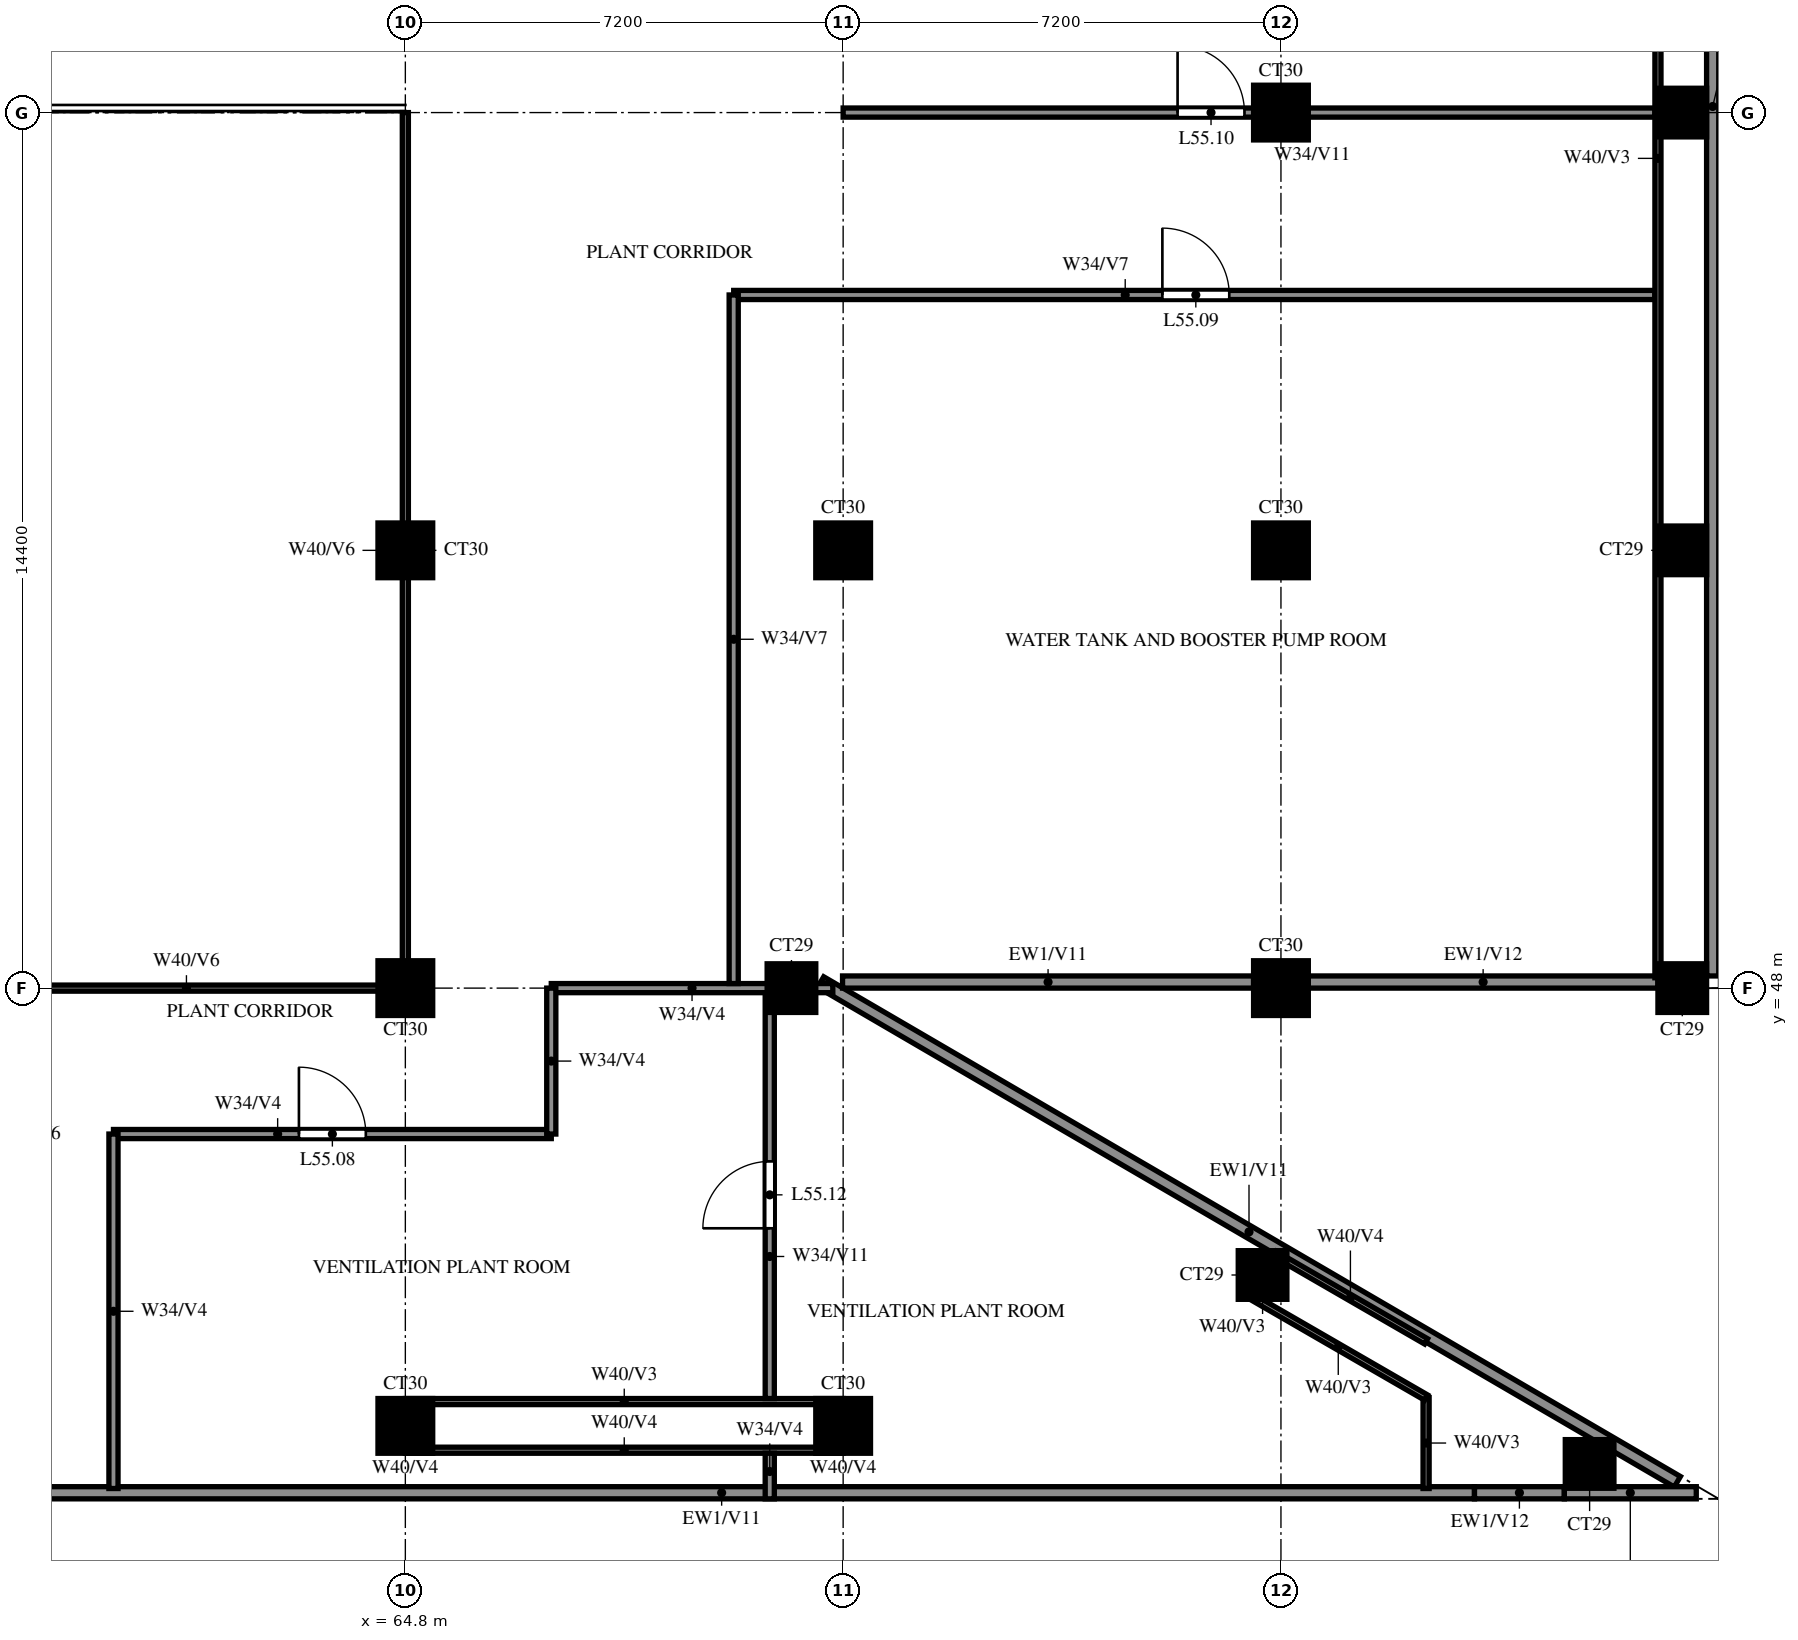
"""IFC4 building model, lengths in metres.
Left out: names, types, materials, properties, quantities, classifications, styles, units other than length and angle.
Written with IfcOpenShell. Run it as: python <this file> out.ifc"""

import sys

from ifc_helpers import new_model, si_unit, direction, frame, frame_2d, origin, origin_2d, place, context, subcontext, project, spatial, rectangle, extrude, source, transform, mapped, element, fill, save


model = new_model("IFC4")
c1 = context("Model", 3, precision=1e-05, world=origin(), true_north=direction((0.0, 1.0)))
c2 = subcontext(c1, "Body", "Model", "MODEL_VIEW")
j1 = project(units=[si_unit("LENGTHUNIT", "METRE"), si_unit("PLANEANGLEUNIT", "RADIAN")], contexts=[c1])
p1 = place(None, origin())
s1 = spatial("IfcSite", under=j1, at=p1, CompositionType="ELEMENT")
p2 = place(p1, origin())
s2 = spatial("IfcBuilding", under=s1, at=p2, CompositionType="ELEMENT")
p3 = place(p2, frame((0.0, 0.0, 206.0)))
s3 = spatial("IfcBuildingStorey", under=s2, at=p3, CompositionType="ELEMENT", Elevation=206.0)
m1 = source(origin(), c2, "Body", "SweptSolid", [
    extrude(rectangle(XDim=0.8, YDim=0.8, at=origin_2d()), origin(), (0.0, 0.0, 1.0), 5.22),
])
p4 = place(p3, frame((84.276, 40.174, 0.0), z_axis=(0.0, 0.0, 1.0), x_axis=(1.0, 0.0, 0.0)))
e1 = element("IfcColumn", 1, at=p4, inside=s3, PredefinedType="COLUMN", context=c2, shape_type="MappedRepresentation", body=[
    mapped(m1, transform((0.0, 0.0, 0.0))),
])
m2 = source(origin(), c2, "Body", "SweptSolid", [
    extrude(rectangle(XDim=0.9, YDim=0.9, at=origin_2d()), origin(), (0.0, 0.0, 1.0), 5.22),
])
for number, where, z_axis, x_axis in (
    (2, (64.8, 40.8, 0.0), (0.0, 0.0, 1.0), (1.0, 0.0, 0.0)),
    (3, (72.0, 40.8, 0.0), (0.0, 0.0, 1.0), (1.0, 0.0, 0.0)),
):
    element("IfcColumn", number, at=place(p3, frame(where, z_axis=z_axis, x_axis=x_axis)), inside=s3, PredefinedType="COLUMN", context=c2, shape_type="MappedRepresentation", body=[
        mapped(m2, transform((0.0, 0.0, 0.0))),
    ])
p5 = place(p3, frame((78.898, 43.282, 0.0), z_axis=(0.0, 0.0, 1.0), x_axis=(1.0, 0.0, 0.0)))
e4 = element("IfcColumn", 4, at=p5, inside=s3, PredefinedType="COLUMN", context=c2, shape_type="MappedRepresentation", body=[
    mapped(m1, transform((0.0, 0.0, 0.0))),
])
p6 = place(p3, frame((64.8, 48.0, 0.0), z_axis=(0.0, 0.0, 1.0), x_axis=(1.0, 0.0, 0.0)))
e5 = element("IfcColumn", 5, at=p6, inside=s3, PredefinedType="COLUMN", context=c2, shape_type="MappedRepresentation", body=[
    mapped(m2, transform((0.0, 0.0, 0.0))),
])
p7 = place(p3, frame((71.15, 48.0, 0.0), z_axis=(0.0, 0.0, 1.0), x_axis=(1.0, 0.0, 0.0)))
e6 = element("IfcColumn", 6, at=p7, inside=s3, PredefinedType="COLUMN", context=c2, shape_type="MappedRepresentation", body=[
    mapped(m1, transform((0.0, 0.0, 0.0))),
])
p8 = place(p3, frame((79.2, 48.0, 0.0), z_axis=(0.0, 0.0, 1.0), x_axis=(1.0, 0.0, 0.0)))
e7 = element("IfcColumn", 7, at=p8, inside=s3, PredefinedType="COLUMN", context=c2, shape_type="MappedRepresentation", body=[
    mapped(m2, transform((0.0, 0.0, 0.0))),
])
p9 = place(p3, frame((85.8, 48.0, 0.0), z_axis=(0.0, 0.0, 1.0), x_axis=(1.0, 0.0, 0.0)))
e8 = element("IfcColumn", 8, at=p9, inside=s3, PredefinedType="COLUMN", context=c2, shape_type="MappedRepresentation", body=[
    mapped(m1, transform((0.0, 0.0, 0.0))),
])
for number, where, z_axis, x_axis in (
    (9, (64.8, 55.2, 0.0), (0.0, 0.0, 1.0), (1.0, 0.0, 0.0)),
    (10, (72.0, 55.2, 0.0), (0.0, 0.0, 1.0), (1.0, 0.0, 0.0)),
    (11, (79.2, 55.2, 0.0), (0.0, 0.0, 1.0), (1.0, 0.0, 0.0)),
):
    element("IfcColumn", number, at=place(p3, frame(where, z_axis=z_axis, x_axis=x_axis)), inside=s3, PredefinedType="COLUMN", context=c2, shape_type="MappedRepresentation", body=[
        mapped(m2, transform((0.0, 0.0, 0.0))),
    ])
p10 = place(p3, frame((85.8, 55.2, 0.0), z_axis=(0.0, 0.0, 1.0), x_axis=(1.0, 0.0, 0.0)))
e12 = element("IfcColumn", 12, at=p10, inside=s3, PredefinedType="COLUMN", context=c2, shape_type="MappedRepresentation", body=[
    mapped(m1, transform((0.0, 0.0, 0.0))),
])
p11 = place(p3, frame((79.2, 62.4, 0.0), z_axis=(0.0, 0.0, 1.0), x_axis=(1.0, 0.0, 0.0)))
e13 = element("IfcColumn", 13, at=p11, inside=s3, PredefinedType="COLUMN", context=c2, shape_type="MappedRepresentation", body=[
    mapped(m2, transform((0.0, 0.0, 0.0))),
])
p12 = place(p3, frame((85.8, 62.4, 0.0), z_axis=(0.0, 0.0, 1.0), x_axis=(1.0, 0.0, 0.0)))
e14 = element("IfcColumn", 14, at=p12, inside=s3, PredefinedType="COLUMN", context=c2, shape_type="MappedRepresentation", body=[
    mapped(m1, transform((0.0, 0.0, 0.0))),
])
p13 = place(p3, frame((85.719, 39.881, 0.0), z_axis=(0.0, 0.0, 1.0), x_axis=(-0.86377618652, 0.503875678716, 0.0)))
e15 = element("IfcWall", 15, at=p13, inside=s3, PredefinedType="SOLIDWALL", context=c2, shape_type="SweptSolid", body=[
    extrude(rectangle(XDim=16.311, YDim=0.2, at=frame_2d((8.156, 0.0))), origin(), (0.0, 0.0, 1.0), 5.22),
])
p14 = place(p3, frame((71.99, 48.1, 0.0), z_axis=(0.0, 0.0, 1.0), x_axis=(1.0, 0.0, 0.0)))
e16 = element("IfcWall", 16, at=p14, inside=s3, PredefinedType="SOLIDWALL", context=c2, shape_type="SweptSolid", body=[
    extrude(rectangle(XDim=6.76, YDim=0.2, at=frame_2d((3.38, 0.0))), origin(), (0.0, 0.0, 1.0), 5.22),
])
p15 = place(p3, frame((79.65, 48.1, 0.0), z_axis=(0.0, 0.0, 1.0), x_axis=(1.0, 0.0, 0.0)))
e17 = element("IfcWall", 17, at=p15, inside=s3, PredefinedType="SOLIDWALL", context=c2, shape_type="SweptSolid", body=[
    extrude(rectangle(XDim=5.75, YDim=0.2, at=frame_2d((2.875, 0.0))), origin(), (0.0, 0.0, 1.0), 3.72),
])
p16 = place(p3, frame((86.3, 48.2, 0.0), z_axis=(0.0, 0.0, 1.0), x_axis=(0.0, 1.0, 0.0)))
e18 = element("IfcWall", 18, at=p16, inside=s3, PredefinedType="SOLIDWALL", context=c2, shape_type="SweptSolid", body=[
    extrude(rectangle(XDim=28.6, YDim=0.2, at=frame_2d((14.3, 0.0))), origin(), (0.0, 0.0, 1.0), 5.22),
])
p17 = place(p3, frame((58.8, 39.7, 0.0), z_axis=(0.0, 0.0, 1.0), x_axis=(1.0, 0.0, 0.0)))
e19 = element("IfcWall", 19, at=p17, inside=s3, PredefinedType="SOLIDWALL", context=c2, shape_type="SweptSolid", body=[
    extrude(rectangle(XDim=23.583, YDim=0.2, at=frame_2d((11.792, 0.0))), origin(), (0.0, 0.0, 1.0), 5.22),
])
p18 = place(p3, frame((64.8, 40.4, 0.0), z_axis=(0.0, 0.0, 1.0), x_axis=(1.0, 0.0, 0.0)))
e20 = element("IfcWall", 20, at=p18, inside=s3, PredefinedType="PARTITIONING", context=c2, shape_type="SweptSolid", body=[
    extrude(rectangle(XDim=7.2, YDim=0.1, at=frame_2d((3.6, 0.0))), origin(), (0.0, 0.0, 1.0), 5.22),
])
p19 = place(p3, frame((64.8, 41.2, 0.0), z_axis=(0.0, 0.0, 1.0), x_axis=(1.0, 0.0, 0.0)))
e21 = element("IfcWall", 21, at=p19, inside=s3, PredefinedType="PARTITIONING", context=c2, shape_type="SweptSolid", body=[
    extrude(rectangle(XDim=7.2, YDim=0.1, at=frame_2d((3.6, 0.0))), origin(), (0.0, 0.0, 1.0), 3.72),
])
p20 = place(p3, frame((60.0, 45.6, 0.0), z_axis=(0.0, 0.0, 1.0), x_axis=(1.0, 0.0, 0.0)))
e22 = element("IfcWall", 22, at=p20, inside=s3, PredefinedType="PARTITIONING", context=c2, shape_type="SweptSolid", body=[
    extrude(rectangle(XDim=7.2, YDim=0.15, at=frame_2d((3.6, 0.0))), origin(), (0.0, 0.0, 1.0), 5.22),
])
p21 = place(p20, frame((3.05, 0.0, 0.0)))
e23 = element("IfcOpeningElement", 23, at=p21, cuts=e22, PredefinedType="OPENING", context=c2, shape_type="SweptSolid", body=[
    extrude(rectangle(XDim=1.1, YDim=2.1, at=frame_2d((0.55, 1.05))), frame((0.0, 0.085, 0.0), z_axis=(0.0, -1.0, 0.0), x_axis=(1.0, 0.0, 0.0)), (0.0, 0.0, 1.0), 0.17),
])
p22 = place(p3, frame((57.6, 48.0, 0.0), z_axis=(0.0, 0.0, 1.0), x_axis=(1.0, 0.0, 0.0)))
e24 = element("IfcWall", 24, at=p22, inside=s3, PredefinedType="PARTITIONING", context=c2, shape_type="SweptSolid", body=[
    extrude(rectangle(XDim=7.2, YDim=0.1, at=frame_2d((3.6, 0.0))), origin(), (0.0, 0.0, 1.0), 4.32),
])
p23 = place(p3, frame((67.2, 48.0, 0.0), z_axis=(0.0, 0.0, 1.0), x_axis=(1.0, 0.0, 0.0)))
e25 = element("IfcWall", 25, at=p23, inside=s3, PredefinedType="PARTITIONING", context=c2, shape_type="SweptSolid", body=[
    extrude(rectangle(XDim=4.63, YDim=0.15, at=frame_2d((2.315, 0.0))), origin(), (0.0, 0.0, 1.0), 5.22),
])
p24 = place(p3, frame((70.2, 59.4, 0.0), z_axis=(0.0, 0.0, 1.0), x_axis=(1.0, 0.0, 0.0)))
e26 = element("IfcWall", 26, at=p24, inside=s3, PredefinedType="PARTITIONING", context=c2, shape_type="SweptSolid", body=[
    extrude(rectangle(XDim=15.15, YDim=0.15, at=frame_2d((7.575, 0.0))), origin(), (0.0, 0.0, 1.0), 4.32),
])
p25 = place(p24, frame((7.05, 0.0, 0.0)))
e27 = element("IfcOpeningElement", 27, at=p25, cuts=e26, PredefinedType="OPENING", context=c2, shape_type="SweptSolid", body=[
    extrude(rectangle(XDim=1.1, YDim=2.1, at=frame_2d((0.55, 1.05))), frame((0.0, 0.085, 0.0), z_axis=(0.0, -1.0, 0.0), x_axis=(1.0, 0.0, 0.0)), (0.0, 0.0, 1.0), 0.17),
])
p26 = place(p3, frame((72.0, 62.4, 0.0), z_axis=(0.0, 0.0, 1.0), x_axis=(1.0, 0.0, 0.0)))
e28 = element("IfcWall", 28, at=p26, inside=s3, PredefinedType="PARTITIONING", context=c2, shape_type="SweptSolid", body=[
    extrude(rectangle(XDim=13.35, YDim=0.15, at=frame_2d((6.675, 0.0))), origin(), (0.0, 0.0, 1.0), 3.72),
])
p27 = place(p26, frame((5.5, 0.0, 0.0)))
e29 = element("IfcOpeningElement", 29, at=p27, cuts=e28, PredefinedType="OPENING", context=c2, shape_type="SweptSolid", body=[
    extrude(rectangle(XDim=1.1, YDim=2.1, at=frame_2d((0.55, 1.05))), frame((0.0, 0.085, 0.0), z_axis=(0.0, -1.0, 0.0), x_axis=(1.0, 0.0, 0.0)), (0.0, 0.0, 1.0), 0.17),
])
p28 = place(p3, frame((60.0, 39.77, 0.0), z_axis=(0.0, 0.0, 1.0), x_axis=(0.0, 1.0, 0.0)))
e30 = element("IfcWall", 30, at=p28, inside=s3, PredefinedType="PARTITIONING", context=c2, shape_type="SweptSolid", body=[
    extrude(rectangle(XDim=5.83, YDim=0.15, at=frame_2d((2.915, 0.0))), origin(), (0.0, 0.0, 1.0), 5.22),
])
p29 = place(p3, frame((64.8, 40.4, 0.0), z_axis=(0.0, 0.0, 1.0), x_axis=(0.0, 1.0, 0.0)))
e31 = element("IfcWall", 31, at=p29, inside=s3, PredefinedType="PARTITIONING", context=c2, shape_type="SweptSolid", body=[
    extrude(rectangle(XDim=0.8, YDim=0.1, at=frame_2d((0.4, 0.0))), origin(), (0.0, 0.0, 1.0), 5.22),
])
p30 = place(p3, frame((64.8, 48.0, 0.0), z_axis=(0.0, 0.0, 1.0), x_axis=(0.0, 1.0, 0.0)))
e32 = element("IfcWall", 32, at=p30, inside=s3, PredefinedType="PARTITIONING", context=c2, shape_type="SweptSolid", body=[
    extrude(rectangle(XDim=14.4, YDim=0.1, at=frame_2d((7.2, 0.0))), origin(), (0.0, 0.0, 1.0), 4.32),
])
p31 = place(p3, frame((67.2, 45.6, 0.0), z_axis=(0.0, 0.0, 1.0), x_axis=(0.0, 1.0, 0.0)))
e33 = element("IfcWall", 33, at=p31, inside=s3, PredefinedType="PARTITIONING", context=c2, shape_type="SweptSolid", body=[
    extrude(rectangle(XDim=2.4, YDim=0.15, at=frame_2d((1.2, 0.0))), origin(), (0.0, 0.0, 1.0), 5.22),
])
p32 = place(p3, frame((70.2, 48.075, 0.0), z_axis=(0.0, 0.0, 1.0), x_axis=(0.0, 1.0, 0.0)))
e34 = element("IfcWall", 34, at=p32, inside=s3, PredefinedType="PARTITIONING", context=c2, shape_type="SweptSolid", body=[
    extrude(rectangle(XDim=11.325, YDim=0.15, at=frame_2d((5.663, 0.0))), origin(), (0.0, 0.0, 1.0), 4.32),
])
p33 = place(p3, frame((70.793, 39.6, 0.0), z_axis=(0.0, 0.0, 1.0), x_axis=(0.0, 1.0, 0.0)))
e35 = element("IfcWall", 35, at=p33, inside=s3, PredefinedType="PARTITIONING", context=c2, shape_type="SweptSolid", body=[
    extrude(rectangle(XDim=0.75, YDim=0.15, at=frame_2d((0.375, 0.0))), origin(), (0.0, 0.0, 1.0), 5.22),
])
p34 = place(p3, frame((70.793, 41.25, 0.0), z_axis=(0.0, 0.0, 1.0), x_axis=(0.0, 1.0, 0.0)))
e36 = element("IfcWall", 36, at=p34, inside=s3, PredefinedType="PARTITIONING", context=c2, shape_type="SweptSolid", body=[
    extrude(rectangle(XDim=6.675, YDim=0.15, at=frame_2d((3.337, 0.0))), origin(), (0.0, 0.0, 1.0), 3.72),
])
p35 = place(p34, frame((2.8, 0.0, 0.0)))
e37 = element("IfcOpeningElement", 37, at=p35, cuts=e36, PredefinedType="OPENING", context=c2, shape_type="SweptSolid", body=[
    extrude(rectangle(XDim=1.1, YDim=2.1, at=frame_2d((0.55, 1.05))), frame((0.0, 0.085, 0.0), z_axis=(0.0, -1.0, 0.0), x_axis=(1.0, 0.0, 0.0)), (0.0, 0.0, 1.0), 0.17),
])
p36 = place(p3, frame((72.0, 40.4, 0.0), z_axis=(0.0, 0.0, 1.0), x_axis=(0.0, 1.0, 0.0)))
e38 = element("IfcWall", 38, at=p36, inside=s3, PredefinedType="PARTITIONING", context=c2, shape_type="SweptSolid", body=[
    extrude(rectangle(XDim=0.8, YDim=0.1, at=frame_2d((0.4, 0.0))), origin(), (0.0, 0.0, 1.0), 5.22),
])
p37 = place(p3, frame((81.587, 39.77, 0.0), z_axis=(0.0, 0.0, 1.0), x_axis=(0.0, 1.0, 0.0)))
e39 = element("IfcWall", 39, at=p37, inside=s3, PredefinedType="PARTITIONING", context=c2, shape_type="SweptSolid", body=[
    extrude(rectangle(XDim=1.496, YDim=0.1, at=frame_2d((0.748, 0.0))), origin(), (0.0, 0.0, 1.0), 3.72),
])
p38 = place(p3, frame((85.4, 48.17, 0.0), z_axis=(0.0, 0.0, 1.0), x_axis=(0.0, 1.0, 0.0)))
e40 = element("IfcWall", 40, at=p38, inside=s3, PredefinedType="PARTITIONING", context=c2, shape_type="SweptSolid", body=[
    extrude(rectangle(XDim=28.372, YDim=0.1, at=frame_2d((14.186, 0.0))), origin(), (0.0, 0.0, 1.0), 3.72),
])
p39 = place(p3, frame((81.587, 41.266, 0.0), z_axis=(0.0, 0.0, 1.0), x_axis=(-0.865891839094, 0.500231269505, 0.0)))
e41 = element("IfcWall", 41, at=p39, inside=s3, PredefinedType="PARTITIONING", context=c2, shape_type="SweptSolid", body=[
    extrude(rectangle(XDim=3.336, YDim=0.1, at=frame_2d((1.668, 0.0))), origin(), (0.0, 0.0, 1.0), 3.72),
])
p40 = place(p3, frame((78.698, 42.935, 0.0), z_axis=(0.0, 0.0, 1.0), x_axis=(0.499880961361, 0.866094119867, 0.0)))
e42 = element("IfcWall", 42, at=p40, inside=s3, PredefinedType="PARTITIONING", context=c2, shape_type="SweptSolid", body=[
    extrude(rectangle(XDim=0.8, YDim=0.1, at=frame_2d((0.4, 0.0))), origin(), (0.0, 0.0, 1.0), 3.72),
])
p41 = place(p3, frame((79.098, 43.628, 0.0), z_axis=(0.0, 0.0, 1.0), x_axis=(0.865881423994, -0.500249297433, 0.0)))
e43 = element("IfcWall", 43, at=p41, inside=s3, PredefinedType="PARTITIONING", context=c2, shape_type="SweptSolid", body=[
    extrude(rectangle(XDim=2.875, YDim=0.1, at=frame_2d((1.437, 0.0))), origin(), (0.0, 0.0, 1.0), 5.22),
])
p42 = place(p3, frame((82.383, 39.7, 0.0), z_axis=(0.0, 0.0, 1.0), x_axis=(1.0, 0.0, 0.0)))
e44 = element("IfcWall", 44, at=p42, inside=s3, PredefinedType="SOLIDWALL", context=c2, shape_type="SweptSolid", body=[
    extrude(rectangle(XDim=1.478, YDim=0.2, at=frame_2d((0.739, 0.0))), origin(), (0.0, 0.0, 1.0), 3.72),
])
p43 = place(p3, frame((83.861, 39.7, 0.0), z_axis=(0.0, 0.0, 1.0), x_axis=(1.0, 0.0, 0.0)))
e45 = element("IfcWall", 45, at=p43, inside=s3, PredefinedType="SOLIDWALL", context=c2, shape_type="SweptSolid", body=[
    extrude(rectangle(XDim=2.169, YDim=0.2, at=frame_2d((1.085, 0.0))), origin(), (0.0, 0.0, 1.0), 5.22),
])
p44 = place(p21, origin())
e46 = element("IfcDoor", 46, at=p44, inside=s3, OperationType="SINGLE_SWING_RIGHT", PredefinedType="DOOR", context=c2, shape_type="SweptSolid", body=[
    extrude(rectangle(XDim=1.1, YDim=2.1, at=frame_2d((0.55, 1.05))), frame((0.0, 0.025, 0.0), z_axis=(0.0, -1.0, 0.0), x_axis=(1.0, 0.0, 0.0)), (0.0, 0.0, 1.0), 0.05),
])
fill(e23, e46)
p45 = place(p25, origin())
e47 = element("IfcDoor", 47, at=p45, inside=s3, OperationType="SINGLE_SWING_RIGHT", PredefinedType="DOOR", context=c2, shape_type="SweptSolid", body=[
    extrude(rectangle(XDim=1.1, YDim=2.1, at=frame_2d((0.55, 1.05))), frame((0.0, 0.025, 0.0), z_axis=(0.0, -1.0, 0.0), x_axis=(1.0, 0.0, 0.0)), (0.0, 0.0, 1.0), 0.05),
])
fill(e27, e47)
p46 = place(p27, origin())
e48 = element("IfcDoor", 48, at=p46, inside=s3, OperationType="SINGLE_SWING_LEFT", PredefinedType="DOOR", context=c2, shape_type="SweptSolid", body=[
    extrude(rectangle(XDim=1.1, YDim=2.1, at=frame_2d((0.55, 1.05))), frame((0.0, 0.025, 0.0), z_axis=(0.0, -1.0, 0.0), x_axis=(1.0, 0.0, 0.0)), (0.0, 0.0, 1.0), 0.05),
])
fill(e29, e48)
p47 = place(p35, origin())
e49 = element("IfcDoor", 49, at=p47, inside=s3, OperationType="SINGLE_SWING_RIGHT", PredefinedType="DOOR", context=c2, shape_type="SweptSolid", body=[
    extrude(rectangle(XDim=1.1, YDim=2.1, at=frame_2d((0.55, 1.05))), frame((0.0, 0.025, 0.0), z_axis=(0.0, -1.0, 0.0), x_axis=(1.0, 0.0, 0.0)), (0.0, 0.0, 1.0), 0.05),
])
fill(e37, e49)
save(model, sys.argv[1])
